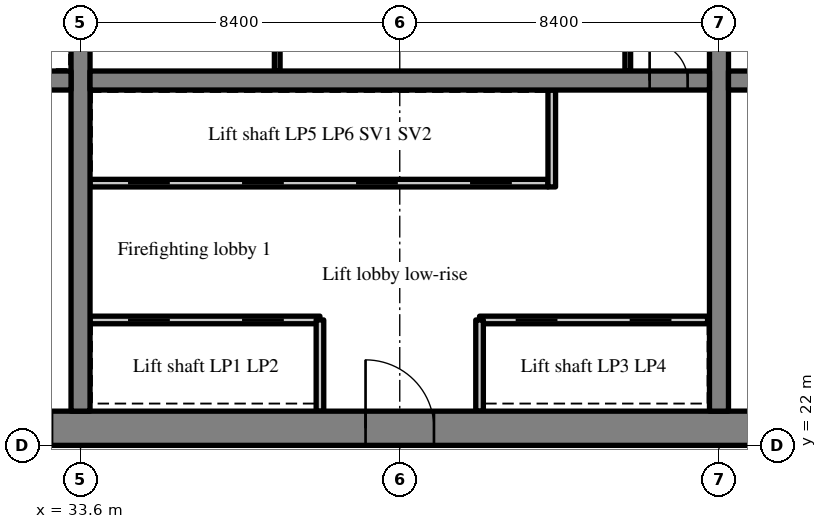
"""IFC4 building model, lengths in metres.
Left out: names, types, materials, properties, quantities, classifications, styles, units other than length and angle.
Written with IfcOpenShell. Run it as: python <this file> out.ifc"""

import sys

from ifc_helpers import new_model, si_unit, direction, frame, frame_2d, origin, place, context, subcontext, project, spatial, rectangle, extrude, source, transform, mapped, element, fill, save


model = new_model("IFC4")
c1 = context("Model", 3, precision=1e-05, world=origin(), true_north=direction((0.0, 1.0)))
c2 = subcontext(c1, "Body", "Model", "MODEL_VIEW")
j1 = project(units=[si_unit("LENGTHUNIT", "METRE"), si_unit("PLANEANGLEUNIT", "RADIAN")], contexts=[c1])
p1 = place(None, origin())
s1 = spatial("IfcSite", under=j1, at=p1, CompositionType="ELEMENT")
p2 = place(p1, origin())
s2 = spatial("IfcBuilding", under=s1, at=p2, CompositionType="ELEMENT")
p3 = place(p2, frame((0.0, 0.0, 137.0)))
s3 = spatial("IfcBuildingStorey", under=s2, at=p3, CompositionType="ELEMENT", Elevation=137.0)
m1 = source(origin(), c2, "Body", "SweptSolid", [
    extrude(rectangle(XDim=50.4, YDim=0.9, at=frame_2d((25.2, 0.0))), origin(), (0.0, 0.0, 1.0), 3.52),
])
p4 = place(p3, frame((25.2, 22.45, 0.0), z_axis=(0.0, 0.0, 1.0), x_axis=(1.0, 0.0, 0.0)))
e1 = element("IfcWall", 1, at=p4, inside=s3, PredefinedType="SHEAR", context=c2, shape_type="MappedRepresentation", body=[
    mapped(m1, transform((0.0, 0.0, 0.0), scale=1.0)),
])
m2 = source(origin(), c2, "Body", "SweptSolid", [
    extrude(rectangle(XDim=1.8, YDim=2.1, at=frame_2d((0.9, 1.05))), frame((0.0, 0.46, 0.0), z_axis=(0.0, -1.0, 0.0), x_axis=(1.0, 0.0, 0.0)), (0.0, 0.0, 1.0), 0.92),
])
p5 = place(p4, frame((15.9, 0.0, 0.0)))
e2 = element("IfcOpeningElement", 2, at=p5, cuts=e1, PredefinedType="OPENING", context=c2, shape_type="MappedRepresentation", body=[
    mapped(m2, transform((0.0, 0.0, 0.0), scale=1.0)),
])
m3 = source(origin(), c2, "Body", "SweptSolid", [
    extrude(rectangle(XDim=1.2, YDim=2.1, at=frame_2d((0.6, 1.05))), frame((0.0, 0.46, 0.0), z_axis=(0.0, -1.0, 0.0), x_axis=(1.0, 0.0, 0.0)), (0.0, 0.0, 1.0), 0.92),
])
p6 = place(p4, frame((26.975, 0.0, 0.0)))
e3 = element("IfcOpeningElement", 3, at=p6, cuts=e1, PredefinedType="OPENING", context=c2, shape_type="MappedRepresentation", body=[
    mapped(m3, transform((0.0, 0.0, 0.0), scale=1.0)),
])
m4 = source(origin(), c2, "Body", "SweptSolid", [
    extrude(rectangle(XDim=0.9, YDim=2.1, at=frame_2d((0.45, 1.05))), frame((0.0, 0.46, 0.0), z_axis=(0.0, -1.0, 0.0), x_axis=(1.0, 0.0, 0.0)), (0.0, 0.0, 1.0), 0.92),
])
p7 = place(p4, frame((34.5, 0.0, 0.0)))
e4 = element("IfcOpeningElement", 4, at=p7, cuts=e1, PredefinedType="OPENING", context=c2, shape_type="MappedRepresentation", body=[
    mapped(m4, transform((0.0, 0.0, 0.0), scale=1.0)),
])
p8 = place(p4, frame((31.5, 0.0, 0.0)))
e5 = element("IfcOpeningElement", 5, at=p8, cuts=e1, PredefinedType="OPENING", context=c2, shape_type="MappedRepresentation", body=[
    mapped(m4, transform((0.0, 0.0, 0.0), scale=1.0)),
])
p9 = place(p4, frame((39.788, 0.0, 0.0)))
e6 = element("IfcOpeningElement", 6, at=p9, cuts=e1, PredefinedType="OPENING", context=c2, shape_type="MappedRepresentation", body=[
    mapped(m4, transform((0.0, 0.0, 0.0), scale=1.0)),
])
p10 = place(p4, frame((36.762, 0.0, 0.0)))
e7 = element("IfcOpeningElement", 7, at=p10, cuts=e1, PredefinedType="OPENING", context=c2, shape_type="MappedRepresentation", body=[
    mapped(m4, transform((0.0, 0.0, 0.0), scale=1.0)),
])
p11 = place(p4, frame((6.45, 0.0, 0.0)))
e8 = element("IfcOpeningElement", 8, at=p11, cuts=e1, PredefinedType="OPENING", context=c2, shape_type="MappedRepresentation", body=[
    mapped(m3, transform((0.0, 0.0, 0.0), scale=1.0)),
])
p12 = place(p4, frame((47.775, 0.0, 0.0)))
e9 = element("IfcOpeningElement", 9, at=p12, cuts=e1, PredefinedType="OPENING", context=c2, shape_type="MappedRepresentation", body=[
    mapped(m3, transform((0.0, 0.0, 0.0), scale=1.0)),
])
m5 = source(origin(), c2, "Body", "SweptSolid", [
    extrude(rectangle(XDim=18.2, YDim=0.5, at=frame_2d((9.1, 0.0))), origin(), (0.0, 0.0, 1.0), 3.52),
])
p13 = place(p3, frame((33.6, 22.9, 0.0), z_axis=(0.0, 0.0, 1.0), x_axis=(0.0, 1.0, 0.0)))
e10 = element("IfcWall", 10, at=p13, inside=s3, PredefinedType="SHEAR", context=c2, shape_type="MappedRepresentation", body=[
    mapped(m5, transform((0.0, 0.0, 0.0), scale=1.0)),
])
m6 = source(origin(), c2, "Body", "SweptSolid", [
    extrude(rectangle(XDim=1.1, YDim=2.1, at=frame_2d((0.55, 1.05))), frame((0.0, 0.26, 0.0), z_axis=(0.0, -1.0, 0.0), x_axis=(1.0, 0.0, 0.0)), (0.0, 0.0, 1.0), 0.52),
])
p14 = place(p13, frame((12.55, 0.0, 0.0)))
e11 = element("IfcOpeningElement", 11, at=p14, cuts=e10, PredefinedType="OPENING", context=c2, shape_type="MappedRepresentation", body=[
    mapped(m6, transform((0.0, 0.0, 0.0), scale=1.0)),
])
p15 = place(p3, frame((50.4, 22.9, 0.0), z_axis=(0.0, 0.0, 1.0), x_axis=(0.0, 1.0, 0.0)))
e12 = element("IfcWall", 12, at=p15, inside=s3, PredefinedType="SHEAR", context=c2, shape_type="MappedRepresentation", body=[
    mapped(m5, transform((0.0, 0.0, 0.0), scale=1.0)),
])
p16 = place(p15, frame((12.55, 0.0, 0.0)))
e13 = element("IfcOpeningElement", 13, at=p16, cuts=e12, PredefinedType="OPENING", context=c2, shape_type="MappedRepresentation", body=[
    mapped(m6, transform((0.0, 0.0, 0.0), scale=1.0)),
])
m7 = source(origin(), c2, "Body", "SweptSolid", [
    extrude(rectangle(XDim=7.25, YDim=0.5, at=frame_2d((3.625, 0.0))), origin(), (0.0, 0.0, 1.0), 3.52),
])
p17 = place(p3, frame((26.1, 31.6, 0.0), z_axis=(0.0, 0.0, 1.0), x_axis=(1.0, 0.0, 0.0)))
e14 = element("IfcWall", 14, at=p17, inside=s3, PredefinedType="SHEAR", context=c2, shape_type="MappedRepresentation", body=[
    mapped(m7, transform((0.0, 0.0, 0.0), scale=1.0)),
])
p18 = place(p17, frame((5.6, 0.0, 0.0)))
e15 = element("IfcOpeningElement", 15, at=p18, cuts=e14, PredefinedType="OPENING", context=c2, shape_type="MappedRepresentation", body=[
    mapped(m6, transform((0.0, 0.0, 0.0), scale=1.0)),
])
m8 = source(origin(), c2, "Body", "SweptSolid", [
    extrude(rectangle(XDim=16.3, YDim=0.5, at=frame_2d((8.15, 0.0))), origin(), (0.0, 0.0, 1.0), 3.52),
])
p19 = place(p3, frame((33.85, 31.6, 0.0), z_axis=(0.0, 0.0, 1.0), x_axis=(1.0, 0.0, 0.0)))
e16 = element("IfcWall", 16, at=p19, inside=s3, PredefinedType="SHEAR", context=c2, shape_type="MappedRepresentation", body=[
    mapped(m8, transform((0.0, 0.0, 0.0), scale=1.0)),
])
m9 = source(origin(), c2, "Body", "SweptSolid", [
    extrude(rectangle(XDim=1.0, YDim=2.1, at=frame_2d((0.5, 1.05))), frame((0.0, 0.26, 0.0), z_axis=(0.0, -1.0, 0.0), x_axis=(1.0, 0.0, 0.0)), (0.0, 0.0, 1.0), 0.52),
])
p20 = place(p19, frame((14.725, 0.0, 0.0)))
e17 = element("IfcOpeningElement", 17, at=p20, cuts=e16, PredefinedType="OPENING", context=c2, shape_type="MappedRepresentation", body=[
    mapped(m9, transform((0.0, 0.0, 0.0), scale=1.0)),
])
m10 = source(origin(), c2, "Body", "SweptSolid", [
    extrude(rectangle(XDim=16.3, YDim=0.5, at=frame_2d((8.15, 0.0))), origin(), (0.0, 0.0, 1.0), 3.52),
])
p21 = place(p3, frame((50.65, 31.6, 0.0), z_axis=(0.0, 0.0, 1.0), x_axis=(1.0, 0.0, 0.0)))
e18 = element("IfcWall", 18, at=p21, inside=s3, PredefinedType="SHEAR", context=c2, shape_type="MappedRepresentation", body=[
    mapped(m10, transform((0.0, 0.0, 0.0), scale=1.0)),
])
p22 = place(p21, frame((0.575, 0.0, 0.0)))
e19 = element("IfcOpeningElement", 19, at=p22, cuts=e18, PredefinedType="OPENING", context=c2, shape_type="MappedRepresentation", body=[
    mapped(m9, transform((0.0, 0.0, 0.0), scale=1.0)),
])
m11 = source(origin(), c2, "Body", "SweptSolid", [
    extrude(rectangle(XDim=6.05, YDim=0.2, at=frame_2d((3.025, 0.0))), origin(), (0.0, 0.0, 1.0), 3.52),
])
p23 = place(p3, frame((33.85, 25.3, 0.0), z_axis=(0.0, 0.0, 1.0), x_axis=(1.0, 0.0, 0.0)))
e20 = element("IfcWall", 20, at=p23, inside=s3, PredefinedType="SOLIDWALL", context=c2, shape_type="MappedRepresentation", body=[
    mapped(m11, transform((0.0, 0.0, 0.0), scale=1.0)),
])
m12 = source(origin(), c2, "Body", "SweptSolid", [
    extrude(rectangle(XDim=1.1, YDim=2.1, at=frame_2d((0.55, 1.05))), frame((0.0, 0.11, 0.0), z_axis=(0.0, -1.0, 0.0), x_axis=(1.0, 0.0, 0.0)), (0.0, 0.0, 1.0), 0.22),
])
p24 = place(p23, frame((1.0, 0.0, 0.0)))
e21 = element("IfcOpeningElement", 21, at=p24, cuts=e20, PredefinedType="OPENING", context=c2, shape_type="MappedRepresentation", body=[
    mapped(m12, transform((0.0, 0.0, 0.0), scale=1.0)),
])
p25 = place(p23, frame((4.0, 0.0, 0.0)))
e22 = element("IfcOpeningElement", 22, at=p25, cuts=e20, PredefinedType="OPENING", context=c2, shape_type="MappedRepresentation", body=[
    mapped(m12, transform((0.0, 0.0, 0.0), scale=1.0)),
])
m13 = source(origin(), c2, "Body", "SweptSolid", [
    extrude(rectangle(XDim=6.0, YDim=0.2, at=frame_2d((3.0, 0.0))), origin(), (0.0, 0.0, 1.0), 3.52),
])
p26 = place(p3, frame((44.1, 25.3, 0.0), z_axis=(0.0, 0.0, 1.0), x_axis=(1.0, 0.0, 0.0)))
e23 = element("IfcWall", 23, at=p26, inside=s3, PredefinedType="SOLIDWALL", context=c2, shape_type="MappedRepresentation", body=[
    mapped(m13, transform((0.0, 0.0, 0.0), scale=1.0)),
])
p27 = place(p26, frame((0.95, 0.0, 0.0)))
e24 = element("IfcOpeningElement", 24, at=p27, cuts=e23, PredefinedType="OPENING", context=c2, shape_type="MappedRepresentation", body=[
    mapped(m12, transform((0.0, 0.0, 0.0), scale=1.0)),
])
p28 = place(p26, frame((3.95, 0.0, 0.0)))
e25 = element("IfcOpeningElement", 25, at=p28, cuts=e23, PredefinedType="OPENING", context=c2, shape_type="MappedRepresentation", body=[
    mapped(m12, transform((0.0, 0.0, 0.0), scale=1.0)),
])
m14 = source(origin(), c2, "Body", "SweptSolid", [
    extrude(rectangle(XDim=12.05, YDim=0.2, at=frame_2d((6.025, 0.0))), origin(), (0.0, 0.0, 1.0), 3.52),
])
p29 = place(p3, frame((33.85, 28.9, 0.0), z_axis=(0.0, 0.0, 1.0), x_axis=(1.0, 0.0, 0.0)))
e26 = element("IfcWall", 26, at=p29, inside=s3, PredefinedType="SOLIDWALL", context=c2, shape_type="MappedRepresentation", body=[
    mapped(m14, transform((0.0, 0.0, 0.0), scale=1.0)),
])
p30 = place(p29, frame((1.0, 0.0, 0.0)))
e27 = element("IfcOpeningElement", 27, at=p30, cuts=e26, PredefinedType="OPENING", context=c2, shape_type="MappedRepresentation", body=[
    mapped(m12, transform((0.0, 0.0, 0.0), scale=1.0)),
])
p31 = place(p29, frame((4.0, 0.0, 0.0)))
e28 = element("IfcOpeningElement", 28, at=p31, cuts=e26, PredefinedType="OPENING", context=c2, shape_type="MappedRepresentation", body=[
    mapped(m12, transform((0.0, 0.0, 0.0), scale=1.0)),
])
p32 = place(p29, frame((7.0, 0.0, 0.0)))
e29 = element("IfcOpeningElement", 29, at=p32, cuts=e26, PredefinedType="OPENING", context=c2, shape_type="MappedRepresentation", body=[
    mapped(m12, transform((0.0, 0.0, 0.0), scale=1.0)),
])
p33 = place(p29, frame((10.0, 0.0, 0.0)))
e30 = element("IfcOpeningElement", 30, at=p33, cuts=e26, PredefinedType="OPENING", context=c2, shape_type="MappedRepresentation", body=[
    mapped(m12, transform((0.0, 0.0, 0.0), scale=1.0)),
])
m15 = source(origin(), c2, "Body", "SweptSolid", [
    extrude(rectangle(XDim=2.4, YDim=0.2, at=frame_2d((1.2, 0.0))), origin(), (0.0, 0.0, 1.0), 3.52),
])
for number, where, z_axis, x_axis in (
    (31, (39.9, 22.9, 0.0), (0.0, 0.0, 1.0), (0.0, 1.0, 0.0)),
    (32, (44.1, 22.9, 0.0), (0.0, 0.0, 1.0), (0.0, 1.0, 0.0)),
):
    element("IfcWall", number, at=place(p3, frame(where, z_axis=z_axis, x_axis=x_axis)), inside=s3, PredefinedType="SOLIDWALL", context=c2, shape_type="MappedRepresentation", body=[
        mapped(m15, transform((0.0, 0.0, 0.0), scale=1.0)),
    ])
m16 = source(origin(), c2, "Body", "SweptSolid", [
    extrude(rectangle(XDim=2.55, YDim=0.2, at=frame_2d((1.275, 0.0))), origin(), (0.0, 0.0, 1.0), 3.52),
])
p34 = place(p3, frame((46.0, 28.8, 0.0), z_axis=(0.0, 0.0, 1.0), x_axis=(0.0, 1.0, 0.0)))
e33 = element("IfcWall", 33, at=p34, inside=s3, PredefinedType="SOLIDWALL", context=c2, shape_type="MappedRepresentation", body=[
    mapped(m16, transform((0.0, 0.0, 0.0), scale=1.0)),
])
m17 = source(origin(), c2, "Body", "SweptSolid", [
    extrude(rectangle(XDim=3.15, YDim=0.15, at=frame_2d((1.575, 0.0))), origin(), (0.0, 0.0, 1.0), 3.52),
])
for number, where, z_axis, x_axis in (
    (34, (48.0, 31.85, 0.0), (0.0, 0.0, 1.0), (0.0, 1.0, 0.0)),
    (35, (38.776, 31.85, 0.0), (0.0, 0.0, 1.0), (0.0, 1.0, 0.0)),
):
    element("IfcWall", number, at=place(p3, frame(where, z_axis=z_axis, x_axis=x_axis)), inside=s3, PredefinedType="PARTITIONING", context=c2, shape_type="MappedRepresentation", body=[
        mapped(m17, transform((0.0, 0.0, 0.0), scale=1.0)),
    ])
m18 = source(origin(), c2, "Body", "SweptSolid", [
    extrude(rectangle(XDim=1.8, YDim=2.1, at=frame_2d((0.9, 1.05))), frame((0.0, 0.375, 0.0), z_axis=(0.0, -1.0, 0.0), x_axis=(1.0, 0.0, 0.0)), (0.0, 0.0, 1.0), 0.05),
])
p35 = place(p5, origin())
e36 = element("IfcDoor", 36, at=p35, inside=s3, OperationType="DOUBLE_DOOR_SINGLE_SWING", PredefinedType="DOOR", context=c2, shape_type="MappedRepresentation", body=[
    mapped(m18, transform((0.0, 0.0, 0.0), scale=1.0)),
])
fill(e2, e36)
m19 = source(origin(), c2, "Body", "SweptSolid", [
    extrude(rectangle(XDim=1.0, YDim=2.1, at=frame_2d((0.5, 1.05))), frame((0.0, 0.025, 0.0), z_axis=(0.0, -1.0, 0.0), x_axis=(1.0, 0.0, 0.0)), (0.0, 0.0, 1.0), 0.05),
])
p36 = place(p20, origin())
e37 = element("IfcDoor", 37, at=p36, inside=s3, OperationType="SINGLE_SWING_LEFT", PredefinedType="DOOR", context=c2, shape_type="MappedRepresentation", body=[
    mapped(m19, transform((0.0, 0.0, 0.0), scale=1.0)),
])
fill(e17, e37)
m20 = source(origin(), c2, "Body", "SweptSolid", [
    extrude(rectangle(XDim=1.1, YDim=2.1, at=frame_2d((0.55, 1.05))), frame((0.0, 0.025, 0.0), z_axis=(0.0, -1.0, 0.0), x_axis=(1.0, 0.0, 0.0)), (0.0, 0.0, 1.0), 0.05),
])
p37 = place(p24, origin())
e38 = element("IfcDoor", 38, at=p37, inside=s3, OperationType="SLIDING_TO_LEFT", PredefinedType="DOOR", context=c2, shape_type="MappedRepresentation", body=[
    mapped(m20, transform((0.0, 0.0, 0.0), scale=1.0)),
])
fill(e21, e38)
p38 = place(p25, origin())
e39 = element("IfcDoor", 39, at=p38, inside=s3, OperationType="SLIDING_TO_RIGHT", PredefinedType="DOOR", context=c2, shape_type="MappedRepresentation", body=[
    mapped(m20, transform((0.0, 0.0, 0.0), scale=1.0)),
])
fill(e22, e39)
p39 = place(p27, origin())
e40 = element("IfcDoor", 40, at=p39, inside=s3, OperationType="SLIDING_TO_LEFT", PredefinedType="DOOR", context=c2, shape_type="MappedRepresentation", body=[
    mapped(m20, transform((0.0, 0.0, 0.0), scale=1.0)),
])
fill(e24, e40)
p40 = place(p28, origin())
e41 = element("IfcDoor", 41, at=p40, inside=s3, OperationType="SLIDING_TO_RIGHT", PredefinedType="DOOR", context=c2, shape_type="MappedRepresentation", body=[
    mapped(m20, transform((0.0, 0.0, 0.0), scale=1.0)),
])
fill(e25, e41)
p41 = place(p30, origin())
e42 = element("IfcDoor", 42, at=p41, inside=s3, OperationType="SLIDING_TO_LEFT", PredefinedType="DOOR", context=c2, shape_type="MappedRepresentation", body=[
    mapped(m20, transform((0.0, 0.0, 0.0), scale=1.0)),
])
fill(e27, e42)
p42 = place(p31, origin())
e43 = element("IfcDoor", 43, at=p42, inside=s3, OperationType="SLIDING_TO_RIGHT", PredefinedType="DOOR", context=c2, shape_type="MappedRepresentation", body=[
    mapped(m20, transform((0.0, 0.0, 0.0), scale=1.0)),
])
fill(e28, e43)
p43 = place(p32, origin())
e44 = element("IfcDoor", 44, at=p43, inside=s3, OperationType="SLIDING_TO_LEFT", PredefinedType="DOOR", context=c2, shape_type="MappedRepresentation", body=[
    mapped(m20, transform((0.0, 0.0, 0.0), scale=1.0)),
])
fill(e29, e44)
p44 = place(p33, origin())
e45 = element("IfcDoor", 45, at=p44, inside=s3, OperationType="SLIDING_TO_RIGHT", PredefinedType="DOOR", context=c2, shape_type="MappedRepresentation", body=[
    mapped(m20, transform((0.0, 0.0, 0.0), scale=1.0)),
])
fill(e30, e45)
save(model, sys.argv[1])
